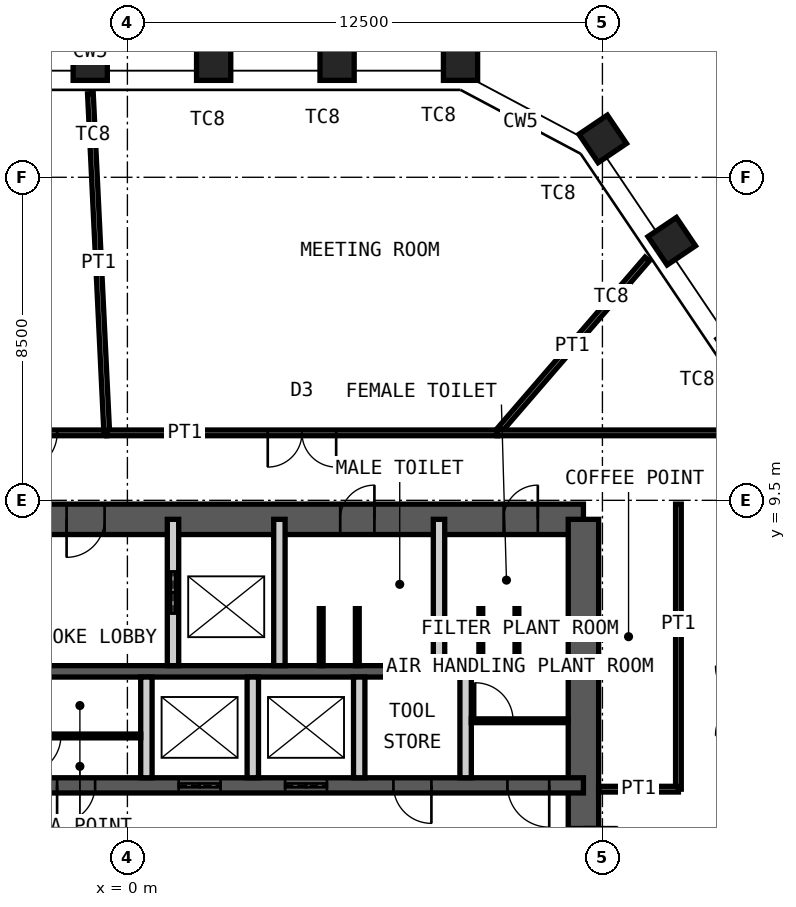
"""IFC4 building model, lengths in metres.
Left out: names, types, materials, properties, quantities, classifications, styles, units other than length and angle.
Written with IfcOpenShell. Run it as: python <this file> out.ifc"""

import sys

from ifc_helpers import new_model, si_unit, direction, frame, frame_2d, origin, origin_2d, place, context, subcontext, project, spatial, rectangle, hollow_rectangle, extrude, element, fill, save


model = new_model("IFC4")
c1 = context("Model", 3, precision=1e-05, world=origin(), true_north=direction((0.0, 1.0)))
c2 = subcontext(c1, "Body", "Model", "MODEL_VIEW")
j1 = project(units=[si_unit("LENGTHUNIT", "METRE"), si_unit("PLANEANGLEUNIT", "RADIAN")], contexts=[c1])
p1 = place(None, origin())
s1 = spatial("IfcSite", under=j1, at=p1, CompositionType="ELEMENT")
p2 = place(p1, origin())
s2 = spatial("IfcBuilding", under=s1, at=p2, CompositionType="ELEMENT")
p3 = place(p2, frame((0.0, 0.0, 304.0)))
s3 = spatial("IfcBuildingStorey", under=s2, at=p3, CompositionType="ELEMENT", Elevation=304.0)
for number, where, z_axis, x_axis in (
    (1, (-0.978, 21.0, 0.0), (0.0, 0.0, 1.0), (-1.0, 0.0, 0.0)),
    (2, (2.27, 21.0, 0.0), (0.0, 0.0, 1.0), (-1.0, 0.0, 0.0)),
    (3, (5.518, 21.0, 0.0), (0.0, 0.0, 1.0), (-1.0, 0.0, 0.0)),
    (4, (8.766, 21.0, 0.0), (0.0, 0.0, 1.0), (-1.0, 0.0, 0.0)),
    (5, (12.508, 19.01, 0.0), (0.0, 0.0, 1.0), (-0.559, 0.829, 0.0)),
    (6, (14.324, 16.318, 0.0), (0.0, 0.0, 1.0), (-0.559, 0.829, 0.0)),
):
    element("IfcColumn", number, at=place(p3, frame(where, z_axis=z_axis, x_axis=x_axis)), inside=s3, PredefinedType="COLUMN", context=c2, shape_type="SweptSolid", body=[
        extrude(hollow_rectangle(XDim=0.9, YDim=0.9, WallThickness=0.05, at=origin_2d()), origin(), (0.0, 0.0, 1.0), 4.2),
    ])
p4 = place(p3, frame((-12.0, 9.0, 0.0), z_axis=(0.0, 0.0, 1.0), x_axis=(1.0, 0.0, 0.0)))
e7 = element("IfcWall", 7, at=p4, inside=s3, PredefinedType="SHEAR", context=c2, shape_type="SweptSolid", body=[
    extrude(rectangle(XDim=24.0, YDim=0.8, at=frame_2d((12.0, 0.0))), origin(), (0.0, 0.0, 1.0), 4.2),
])
p5 = place(p4, frame((10.4, 0.0, 0.0)))
e8 = element("IfcOpeningElement", 8, at=p5, cuts=e7, PredefinedType="OPENING", context=c2, shape_type="SweptSolid", body=[
    extrude(rectangle(XDim=1.0, YDim=2.1, at=frame_2d((0.5, 1.05))), frame((0.0, 0.41, 0.0), z_axis=(0.0, -1.0, 0.0), x_axis=(1.0, 0.0, 0.0)), (0.0, 0.0, 1.0), 0.82),
])
p6 = place(p4, frame((17.6, 0.0, 0.0)))
e9 = element("IfcOpeningElement", 9, at=p6, cuts=e7, PredefinedType="OPENING", context=c2, shape_type="SweptSolid", body=[
    extrude(rectangle(XDim=0.9, YDim=2.1, at=frame_2d((0.45, 1.05))), frame((0.0, 0.41, 0.0), z_axis=(0.0, -1.0, 0.0), x_axis=(1.0, 0.0, 0.0)), (0.0, 0.0, 1.0), 0.82),
])
p7 = place(p4, frame((21.9, 0.0, 0.0)))
e10 = element("IfcOpeningElement", 10, at=p7, cuts=e7, PredefinedType="OPENING", context=c2, shape_type="SweptSolid", body=[
    extrude(rectangle(XDim=0.9, YDim=2.1, at=frame_2d((0.45, 1.05))), frame((0.0, 0.41, 0.0), z_axis=(0.0, -1.0, 0.0), x_axis=(1.0, 0.0, 0.0)), (0.0, 0.0, 1.0), 0.82),
])
p8 = place(p3, frame((12.0, -9.0, 0.0), z_axis=(0.0, 0.0, 1.0), x_axis=(0.0, 1.0, 0.0)))
e11 = element("IfcWall", 11, at=p8, inside=s3, PredefinedType="SHEAR", context=c2, shape_type="SweptSolid", body=[
    extrude(rectangle(XDim=18.0, YDim=0.8, at=frame_2d((9.0, 0.0))), origin(), (0.0, 0.0, 1.0), 4.2),
])
p9 = place(p8, frame((8.1, 0.0, 0.0)))
e12 = element("IfcOpeningElement", 12, at=p9, cuts=e11, PredefinedType="OPENING", context=c2, shape_type="SweptSolid", body=[
    extrude(rectangle(XDim=1.8, YDim=2.1, at=frame_2d((0.9, 1.05))), frame((0.0, 0.41, 0.0), z_axis=(0.0, -1.0, 0.0), x_axis=(1.0, 0.0, 0.0)), (0.0, 0.0, 1.0), 0.82),
])
p10 = place(p3, frame((-12.0, 5.0, 0.0), z_axis=(0.0, 0.0, 1.0), x_axis=(1.0, 0.0, 0.0)))
e13 = element("IfcWall", 13, at=p10, inside=s3, PredefinedType="SHEAR", context=c2, shape_type="SweptSolid", body=[
    extrude(rectangle(XDim=24.0, YDim=0.3, at=frame_2d((12.0, 0.0))), origin(), (0.0, 0.0, 1.0), 4.2),
])
p11 = place(p3, frame((-12.0, 2.0, 0.0), z_axis=(0.0, 0.0, 1.0), x_axis=(1.0, 0.0, 0.0)))
e14 = element("IfcWall", 14, at=p11, inside=s3, PredefinedType="SHEAR", context=c2, shape_type="SweptSolid", body=[
    extrude(rectangle(XDim=24.0, YDim=0.4, at=frame_2d((12.0, 0.0))), origin(), (0.0, 0.0, 1.0), 4.2),
])
p12 = place(p11, frame((2.4, 0.0, 0.0)))
e15 = element("IfcOpeningElement", 15, at=p12, cuts=e14, PredefinedType="OPENING", context=c2, shape_type="SweptSolid", body=[
    extrude(rectangle(XDim=1.1, YDim=2.1, at=frame_2d((0.55, 1.05))), frame((0.0, 0.21, 0.0), z_axis=(0.0, -1.0, 0.0), x_axis=(1.0, 0.0, 0.0)), (0.0, 0.0, 1.0), 0.42),
])
p13 = place(p11, frame((22.0, 0.0, 0.0)))
e16 = element("IfcOpeningElement", 16, at=p13, cuts=e14, PredefinedType="OPENING", context=c2, shape_type="SweptSolid", body=[
    extrude(rectangle(XDim=1.1, YDim=2.1, at=frame_2d((0.55, 1.05))), frame((0.0, 0.21, 0.0), z_axis=(0.0, -1.0, 0.0), x_axis=(1.0, 0.0, 0.0)), (0.0, 0.0, 1.0), 0.42),
])
p14 = place(p11, frame((10.15, 0.0, 0.0)))
e17 = element("IfcOpeningElement", 17, at=p14, cuts=e14, PredefinedType="OPENING", context=c2, shape_type="SweptSolid", body=[
    extrude(rectangle(XDim=1.0, YDim=2.1, at=frame_2d((0.5, 1.05))), frame((0.0, 0.21, 0.0), z_axis=(0.0, -1.0, 0.0), x_axis=(1.0, 0.0, 0.0)), (0.0, 0.0, 1.0), 0.42),
])
p15 = place(p11, frame((6.9, 0.0, 0.0)))
e18 = element("IfcOpeningElement", 18, at=p15, cuts=e14, PredefinedType="OPENING", context=c2, shape_type="SweptSolid", body=[
    extrude(rectangle(XDim=1.0, YDim=2.1, at=frame_2d((0.5, 1.05))), frame((0.0, 0.21, 0.0), z_axis=(0.0, -1.0, 0.0), x_axis=(1.0, 0.0, 0.0)), (0.0, 0.0, 1.0), 0.42),
])
p16 = place(p11, frame((13.35, 0.0, 0.0)))
e19 = element("IfcOpeningElement", 19, at=p16, cuts=e14, PredefinedType="OPENING", context=c2, shape_type="SweptSolid", body=[
    extrude(rectangle(XDim=1.1, YDim=2.4, at=frame_2d((0.55, 1.2))), frame((0.0, 0.21, 0.0), z_axis=(0.0, -1.0, 0.0), x_axis=(1.0, 0.0, 0.0)), (0.0, 0.0, 1.0), 0.42),
])
p17 = place(p11, frame((16.15, 0.0, 0.0)))
e20 = element("IfcOpeningElement", 20, at=p17, cuts=e14, PredefinedType="OPENING", context=c2, shape_type="SweptSolid", body=[
    extrude(rectangle(XDim=1.1, YDim=2.4, at=frame_2d((0.55, 1.2))), frame((0.0, 0.21, 0.0), z_axis=(0.0, -1.0, 0.0), x_axis=(1.0, 0.0, 0.0)), (0.0, 0.0, 1.0), 0.42),
])
p18 = place(p11, frame((19.0, 0.0, 0.0)))
e21 = element("IfcOpeningElement", 21, at=p18, cuts=e14, PredefinedType="OPENING", context=c2, shape_type="SweptSolid", body=[
    extrude(rectangle(XDim=1.0, YDim=2.1, at=frame_2d((0.5, 1.05))), frame((0.0, 0.21, 0.0), z_axis=(0.0, -1.0, 0.0), x_axis=(1.0, 0.0, 0.0)), (0.0, 0.0, 1.0), 0.42),
])
p19 = place(p3, frame((1.2, 5.15, 0.0), z_axis=(0.0, 0.0, 1.0), x_axis=(0.0, 1.0, 0.0)))
e22 = element("IfcWall", 22, at=p19, inside=s3, PredefinedType="PARTITIONING", context=c2, shape_type="SweptSolid", body=[
    extrude(rectangle(XDim=3.85, YDim=0.3, at=frame_2d((1.925, 0.0))), origin(), (0.0, 0.0, 1.0), 3.98),
])
p20 = place(p19, frame((1.375, 0.0, 0.0)))
e23 = element("IfcOpeningElement", 23, at=p20, cuts=e22, PredefinedType="OPENING", context=c2, shape_type="SweptSolid", body=[
    extrude(rectangle(XDim=1.1, YDim=2.4, at=frame_2d((0.55, 1.2))), frame((0.0, 0.16, 0.0), z_axis=(0.0, -1.0, 0.0), x_axis=(1.0, 0.0, 0.0)), (0.0, 0.0, 1.0), 0.32),
])
for number, where, z_axis, x_axis in (
    (24, (4.0, 5.15, 0.0), (0.0, 0.0, 1.0), (0.0, 1.0, 0.0)),
    (25, (8.2, 5.15, 0.0), (0.0, 0.0, 1.0), (0.0, 1.0, 0.0)),
):
    element("IfcWall", number, at=place(p3, frame(where, z_axis=z_axis, x_axis=x_axis)), inside=s3, PredefinedType="PARTITIONING", context=c2, shape_type="SweptSolid", body=[
        extrude(rectangle(XDim=3.85, YDim=0.3, at=frame_2d((1.925, 0.0))), origin(), (0.0, 0.0, 1.0), 3.98),
    ])
for number, where, z_axis, x_axis in (
    (26, (0.5, 2.2, 0.0), (0.0, 0.0, 1.0), (0.0, 1.0, 0.0)),
    (27, (3.3, 2.2, 0.0), (0.0, 0.0, 1.0), (0.0, 1.0, 0.0)),
    (28, (6.1, 2.2, 0.0), (0.0, 0.0, 1.0), (0.0, 1.0, 0.0)),
    (29, (8.9, 2.2, 0.0), (0.0, 0.0, 1.0), (0.0, 1.0, 0.0)),
):
    element("IfcWall", number, at=place(p3, frame(where, z_axis=z_axis, x_axis=x_axis)), inside=s3, PredefinedType="PARTITIONING", context=c2, shape_type="SweptSolid", body=[
        extrude(rectangle(XDim=2.65, YDim=0.3, at=frame_2d((1.325, 0.0))), origin(), (0.0, 0.0, 1.0), 3.98),
    ])
p21 = place(p3, frame((-2.85, 3.3, 0.0), z_axis=(0.0, 0.0, 1.0), x_axis=(1.0, 0.0, 0.0)))
e30 = element("IfcWall", 30, at=p21, inside=s3, PredefinedType="PARTITIONING", context=c2, shape_type="SweptSolid", body=[
    extrude(rectangle(XDim=3.2, YDim=0.1, at=frame_2d((1.6, 0.0))), origin(), (0.0, 0.0, 1.0), 3.98),
])
p22 = place(p21, frame((0.1, 0.0, 0.0)))
e31 = element("IfcOpeningElement", 31, at=p22, cuts=e30, PredefinedType="OPENING", context=c2, shape_type="SweptSolid", body=[
    extrude(rectangle(XDim=1.0, YDim=2.4, at=frame_2d((0.5, 1.2))), frame((0.0, 0.06, 0.0), z_axis=(0.0, -1.0, 0.0), x_axis=(1.0, 0.0, 0.0)), (0.0, 0.0, 1.0), 0.12),
])
p23 = place(p3, frame((9.05, 3.7, 0.0), z_axis=(0.0, 0.0, 1.0), x_axis=(1.0, 0.0, 0.0)))
e32 = element("IfcWall", 32, at=p23, inside=s3, PredefinedType="PARTITIONING", context=c2, shape_type="SweptSolid", body=[
    extrude(rectangle(XDim=2.55, YDim=0.1, at=frame_2d((1.275, 0.0))), origin(), (0.0, 0.0, 1.0), 3.98),
])
p24 = place(p23, frame((0.1, 0.0, 0.0)))
e33 = element("IfcOpeningElement", 33, at=p24, cuts=e32, PredefinedType="OPENING", context=c2, shape_type="SweptSolid", body=[
    extrude(rectangle(XDim=1.0, YDim=2.4, at=frame_2d((0.5, 1.2))), frame((0.0, 0.06, 0.0), z_axis=(0.0, -1.0, 0.0), x_axis=(1.0, 0.0, 0.0)), (0.0, 0.0, 1.0), 0.12),
])
for number, where, z_axis, x_axis in (
    (34, (5.1, 5.15, 0.0), (0.0, 0.0, 1.0), (0.0, 1.0, 0.0)),
    (35, (6.05, 5.15, 0.0), (0.0, 0.0, 1.0), (0.0, 1.0, 0.0)),
    (36, (9.3, 5.15, 0.0), (0.0, 0.0, 1.0), (0.0, 1.0, 0.0)),
    (37, (10.25, 5.15, 0.0), (0.0, 0.0, 1.0), (0.0, 1.0, 0.0)),
):
    element("IfcWall", number, at=place(p3, frame(where, z_axis=z_axis, x_axis=x_axis)), inside=s3, PredefinedType="PARTITIONING", context=c2, shape_type="SweptSolid", body=[
        extrude(rectangle(XDim=1.5, YDim=0.1, at=frame_2d((0.75, 0.0))), origin(), (0.0, 0.0, 1.0), 2.1),
    ])
p25 = place(p3, frame((13.678, 15.85, 0.0), z_axis=(0.0, 0.0, 1.0), x_axis=(-0.65333269737, -0.757070925704, 0.0)))
e38 = element("IfcWall", 38, at=p25, inside=s3, PredefinedType="PARTITIONING", context=c2, shape_type="SweptSolid", body=[
    extrude(rectangle(XDim=6.044, YDim=0.15, at=frame_2d((3.022, 0.0))), origin(), (0.0, 0.0, 1.0), 3.33),
])
p26 = place(p3, frame((9.73, 11.275, 0.0), z_axis=(0.0, 0.0, 1.0), x_axis=(1.0, 0.0, 0.0)))
e39 = element("IfcWall", 39, at=p26, inside=s3, PredefinedType="PARTITIONING", context=c2, shape_type="SweptSolid", body=[
    extrude(rectangle(XDim=6.645, YDim=0.15, at=frame_2d((3.323, 0.0))), origin(), (0.0, 0.0, 1.0), 4.03),
])
p27 = place(p3, frame((-4.151, 11.275, 0.0), z_axis=(0.0, 0.0, 1.0), x_axis=(1.0, 0.0, 0.0)))
e40 = element("IfcWall", 40, at=p27, inside=s3, PredefinedType="PARTITIONING", context=c2, shape_type="SweptSolid", body=[
    extrude(rectangle(XDim=3.608, YDim=0.15, at=frame_2d((1.804, 0.0))), origin(), (0.0, 0.0, 1.0), 4.03),
])
p28 = place(p27, frame((1.304, 0.0, 0.0)))
e41 = element("IfcOpeningElement", 41, at=p28, cuts=e40, PredefinedType="OPENING", context=c2, shape_type="SweptSolid", body=[
    extrude(rectangle(XDim=1.0, YDim=2.4, at=frame_2d((0.5, 1.2))), frame((0.0, 0.085, 0.0), z_axis=(0.0, -1.0, 0.0), x_axis=(1.0, 0.0, 0.0)), (0.0, 0.0, 1.0), 0.17),
])
p29 = place(p3, frame((-0.973, 20.2, 0.0), z_axis=(0.0, 0.0, 1.0), x_axis=(0.04814150135, -0.998840525734, 0.0)))
e42 = element("IfcWall", 42, at=p29, inside=s3, PredefinedType="PARTITIONING", context=c2, shape_type="SweptSolid", body=[
    extrude(rectangle(XDim=8.936, YDim=0.15, at=frame_2d((4.468, 0.0))), origin(), (0.0, 0.0, 1.0), 3.33),
])
p30 = place(p3, frame((-0.543, 11.275, 0.0), z_axis=(0.0, 0.0, 1.0), x_axis=(1.0, 0.0, 0.0)))
e43 = element("IfcWall", 43, at=p30, inside=s3, PredefinedType="PARTITIONING", context=c2, shape_type="SweptSolid", body=[
    extrude(rectangle(XDim=10.273, YDim=0.15, at=frame_2d((5.137, 0.0))), origin(), (0.0, 0.0, 1.0), 4.03),
])
p31 = place(p30, frame((4.237, 0.0, 0.0)))
e44 = element("IfcOpeningElement", 44, at=p31, cuts=e43, PredefinedType="OPENING", context=c2, shape_type="SweptSolid", body=[
    extrude(rectangle(XDim=1.8, YDim=2.4, at=frame_2d((0.9, 1.2))), frame((0.0, 0.085, 0.0), z_axis=(0.0, -1.0, 0.0), x_axis=(1.0, 0.0, 0.0)), (0.0, 0.0, 1.0), 0.17),
])
p32 = place(p3, frame((14.5, 1.9, 0.0), z_axis=(0.0, 0.0, 1.0), x_axis=(0.0, 1.0, 0.0)))
e45 = element("IfcWall", 45, at=p32, inside=s3, PredefinedType="PARTITIONING", context=c2, shape_type="SweptSolid", body=[
    extrude(rectangle(XDim=7.5, YDim=0.15, at=frame_2d((3.75, 0.0))), origin(), (0.0, 0.0, 1.0), 4.03),
])
p33 = place(p3, frame((12.4, 1.9, 0.0), z_axis=(0.0, 0.0, 1.0), x_axis=(1.0, 0.0, 0.0)))
e46 = element("IfcWall", 46, at=p33, inside=s3, PredefinedType="PARTITIONING", context=c2, shape_type="SweptSolid", body=[
    extrude(rectangle(XDim=2.1, YDim=0.15, at=frame_2d((1.05, 0.0))), origin(), (0.0, 0.0, 1.0), 2.93),
])
p34 = place(p5, origin())
e47 = element("IfcDoor", 47, at=p34, inside=s3, OperationType="SINGLE_SWING_LEFT", PredefinedType="DOOR", context=c2, shape_type="SweptSolid", body=[
    extrude(rectangle(XDim=1.0, YDim=2.1, at=frame_2d((0.5, 1.05))), frame((0.0, 0.025, 0.0), z_axis=(0.0, -1.0, 0.0), x_axis=(1.0, 0.0, 0.0)), (0.0, 0.0, 1.0), 0.05),
])
fill(e8, e47)
p35 = place(p6, origin())
e48 = element("IfcDoor", 48, at=p35, inside=s3, OperationType="SINGLE_SWING_LEFT", PredefinedType="DOOR", context=c2, shape_type="SweptSolid", body=[
    extrude(rectangle(XDim=0.9, YDim=2.1, at=frame_2d((0.45, 1.05))), frame((0.0, 0.025, 0.0), z_axis=(0.0, -1.0, 0.0), x_axis=(1.0, 0.0, 0.0)), (0.0, 0.0, 1.0), 0.05),
])
fill(e9, e48)
p36 = place(p7, origin())
e49 = element("IfcDoor", 49, at=p36, inside=s3, OperationType="SINGLE_SWING_LEFT", PredefinedType="DOOR", context=c2, shape_type="SweptSolid", body=[
    extrude(rectangle(XDim=0.9, YDim=2.1, at=frame_2d((0.45, 1.05))), frame((0.0, 0.025, 0.0), z_axis=(0.0, -1.0, 0.0), x_axis=(1.0, 0.0, 0.0)), (0.0, 0.0, 1.0), 0.05),
])
fill(e10, e49)
p37 = place(p13, origin())
e50 = element("IfcDoor", 50, at=p37, inside=s3, OperationType="SINGLE_SWING_RIGHT", PredefinedType="DOOR", context=c2, shape_type="SweptSolid", body=[
    extrude(rectangle(XDim=1.1, YDim=2.1, at=frame_2d((0.55, 1.05))), frame((0.0, 0.025, 0.0), z_axis=(0.0, -1.0, 0.0), x_axis=(1.0, 0.0, 0.0)), (0.0, 0.0, 1.0), 0.05),
])
fill(e16, e50)
p38 = place(p14, origin())
e51 = element("IfcDoor", 51, at=p38, inside=s3, OperationType="SINGLE_SWING_LEFT", PredefinedType="DOOR", context=c2, shape_type="SweptSolid", body=[
    extrude(rectangle(XDim=1.0, YDim=2.1, at=frame_2d((0.5, 1.05))), frame((0.0, 0.025, 0.0), z_axis=(0.0, -1.0, 0.0), x_axis=(1.0, 0.0, 0.0)), (0.0, 0.0, 1.0), 0.05),
])
fill(e17, e51)
p39 = place(p9, origin())
e52 = element("IfcDoor", 52, at=p39, inside=s3, OperationType="DOUBLE_DOOR_DOUBLE_SWING", PredefinedType="DOOR", context=c2, shape_type="SweptSolid", body=[
    extrude(rectangle(XDim=1.8, YDim=2.1, at=frame_2d((0.9, 1.05))), frame((0.0, 0.025, 0.0), z_axis=(0.0, -1.0, 0.0), x_axis=(1.0, 0.0, 0.0)), (0.0, 0.0, 1.0), 0.05),
])
fill(e12, e52)
p40 = place(p20, origin())
e53 = element("IfcDoor", 53, at=p40, inside=s3, OperationType="DOUBLE_DOOR_SLIDING", PredefinedType="DOOR", context=c2, shape_type="SweptSolid", body=[
    extrude(rectangle(XDim=1.1, YDim=2.4, at=frame_2d((0.55, 1.2))), frame((0.0, 0.025, 0.0), z_axis=(0.0, -1.0, 0.0), x_axis=(1.0, 0.0, 0.0)), (0.0, 0.0, 1.0), 0.05),
])
fill(e23, e53)
p41 = place(p16, origin())
e54 = element("IfcDoor", 54, at=p41, inside=s3, OperationType="DOUBLE_DOOR_SLIDING", PredefinedType="DOOR", context=c2, shape_type="SweptSolid", body=[
    extrude(rectangle(XDim=1.1, YDim=2.4, at=frame_2d((0.55, 1.2))), frame((0.0, 0.025, 0.0), z_axis=(0.0, -1.0, 0.0), x_axis=(1.0, 0.0, 0.0)), (0.0, 0.0, 1.0), 0.05),
])
fill(e19, e54)
p42 = place(p17, origin())
e55 = element("IfcDoor", 55, at=p42, inside=s3, OperationType="DOUBLE_DOOR_SLIDING", PredefinedType="DOOR", context=c2, shape_type="SweptSolid", body=[
    extrude(rectangle(XDim=1.1, YDim=2.4, at=frame_2d((0.55, 1.2))), frame((0.0, 0.025, 0.0), z_axis=(0.0, -1.0, 0.0), x_axis=(1.0, 0.0, 0.0)), (0.0, 0.0, 1.0), 0.05),
])
fill(e20, e55)
p43 = place(p18, origin())
e56 = element("IfcDoor", 56, at=p43, inside=s3, OperationType="SINGLE_SWING_RIGHT", PredefinedType="DOOR", context=c2, shape_type="SweptSolid", body=[
    extrude(rectangle(XDim=1.0, YDim=2.1, at=frame_2d((0.5, 1.05))), frame((0.0, 0.025, 0.0), z_axis=(0.0, -1.0, 0.0), x_axis=(1.0, 0.0, 0.0)), (0.0, 0.0, 1.0), 0.05),
])
fill(e21, e56)
p44 = place(p22, origin())
e57 = element("IfcDoor", 57, at=p44, inside=s3, OperationType="SINGLE_SWING_LEFT", PredefinedType="DOOR", context=c2, shape_type="SweptSolid", body=[
    extrude(rectangle(XDim=1.0, YDim=2.4, at=frame_2d((0.5, 1.2))), frame((0.0, 0.025, 0.0), z_axis=(0.0, -1.0, 0.0), x_axis=(1.0, 0.0, 0.0)), (0.0, 0.0, 1.0), 0.05),
])
fill(e31, e57)
p45 = place(p24, origin())
e58 = element("IfcDoor", 58, at=p45, inside=s3, OperationType="SINGLE_SWING_RIGHT", PredefinedType="DOOR", context=c2, shape_type="SweptSolid", body=[
    extrude(rectangle(XDim=1.0, YDim=2.4, at=frame_2d((0.5, 1.2))), frame((0.0, 0.025, 0.0), z_axis=(0.0, -1.0, 0.0), x_axis=(1.0, 0.0, 0.0)), (0.0, 0.0, 1.0), 0.05),
])
fill(e33, e58)
p46 = place(p28, origin())
e59 = element("IfcDoor", 59, at=p46, inside=s3, OperationType="SINGLE_SWING_LEFT", PredefinedType="DOOR", context=c2, shape_type="SweptSolid", body=[
    extrude(rectangle(XDim=1.0, YDim=2.4, at=frame_2d((0.5, 1.2))), frame((0.0, 0.025, 0.0), z_axis=(0.0, -1.0, 0.0), x_axis=(1.0, 0.0, 0.0)), (0.0, 0.0, 1.0), 0.05),
])
fill(e41, e59)
p47 = place(p31, origin())
e60 = element("IfcDoor", 60, at=p47, inside=s3, OperationType="DOUBLE_DOOR_DOUBLE_SWING", PredefinedType="DOOR", context=c2, shape_type="SweptSolid", body=[
    extrude(rectangle(XDim=1.8, YDim=2.4, at=frame_2d((0.9, 1.2))), frame((0.0, 0.025, 0.0), z_axis=(0.0, -1.0, 0.0), x_axis=(1.0, 0.0, 0.0)), (0.0, 0.0, 1.0), 0.05),
])
fill(e44, e60)
save(model, sys.argv[1])
